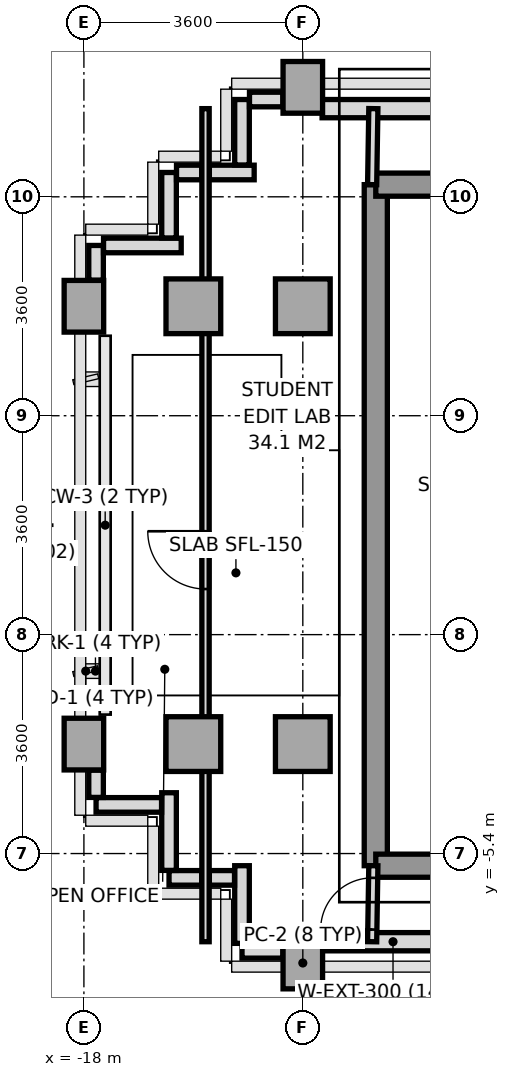
"""IFC4 building model, lengths in metres.
Left out: names, types, materials, properties, quantities, classifications, styles, units other than length and angle.
Written with IfcOpenShell. Run it as: python <this file> out.ifc"""

import sys

from ifc_helpers import new_model, si_unit, direction, frame, frame_2d, origin, origin_2d, place, context, subcontext, project, spatial, rectangle, extrude, source, transform, mapped, element, fill, save


model = new_model("IFC4")
c1 = context("Model", 3, precision=1e-05, world=origin(), true_north=direction((0.0, 1.0)))
c2 = subcontext(c1, "Body", "Model", "MODEL_VIEW")
j1 = project(units=[si_unit("LENGTHUNIT", "METRE"), si_unit("PLANEANGLEUNIT", "RADIAN")], contexts=[c1])
p1 = place(None, origin())
s1 = spatial("IfcSite", under=j1, at=p1, CompositionType="ELEMENT")
p2 = place(p1, origin())
s2 = spatial("IfcBuilding", under=s1, at=p2, CompositionType="ELEMENT")
p3 = place(p2, frame((0.0, 0.0, 170.6)))
s3 = spatial("IfcBuildingStorey", under=s2, at=p3, CompositionType="ELEMENT", Elevation=170.6)
m1 = source(origin(), c2, "Body", "SweptSolid", [
    extrude(rectangle(XDim=0.65, YDim=0.85, at=origin_2d()), origin(), (0.0, 0.0, 1.0), 3.2),
])
for number, where, z_axis, x_axis in (
    (1, (-18.0, -3.6, 0.0), (0.0, 0.0, 1.0), (1.0, 0.0, 0.0)),
    (2, (-18.0, 3.6, 0.0), (0.0, 0.0, 1.0), (1.0, 0.0, 0.0)),
):
    element("IfcColumn", number, at=place(p3, frame(where, z_axis=z_axis, x_axis=x_axis)), inside=s3, PredefinedType="COLUMN", context=c2, shape_type="MappedRepresentation", body=[
        mapped(m1, transform((0.0, 0.0, 0.0), x_axis=(1.0, 0.0, 0.0), y_axis=(0.0, 1.0, 0.0), z_axis=(0.0, 0.0, 1.0), scale=1.0)),
    ])
m2 = source(origin(), c2, "Body", "SweptSolid", [
    extrude(rectangle(XDim=0.9, YDim=0.9, at=origin_2d()), origin(), (0.0, 0.0, 1.0), 3.2),
])
for number, where, z_axis, x_axis in (
    (3, (-16.2, -3.6, 0.0), (0.0, 0.0, 1.0), (1.0, 0.0, 0.0)),
    (4, (-16.2, 3.6, 0.0), (0.0, 0.0, 1.0), (1.0, 0.0, 0.0)),
):
    element("IfcColumn", number, at=place(p3, frame(where, z_axis=z_axis, x_axis=x_axis)), inside=s3, PredefinedType="COLUMN", context=c2, shape_type="MappedRepresentation", body=[
        mapped(m2, transform((0.0, 0.0, 0.0), x_axis=(1.0, 0.0, 0.0), y_axis=(0.0, 1.0, 0.0), z_axis=(0.0, 0.0, 1.0), scale=1.0)),
    ])
p4 = place(p3, frame((-14.4, -7.2, 0.0), z_axis=(0.0, 0.0, 1.0), x_axis=(1.0, 0.0, 0.0)))
e5 = element("IfcColumn", 5, at=p4, inside=s3, PredefinedType="COLUMN", context=c2, shape_type="MappedRepresentation", body=[
    mapped(m1, transform((0.0, 0.0, 0.0), x_axis=(1.0, 0.0, 0.0), y_axis=(0.0, 1.0, 0.0), z_axis=(0.0, 0.0, 1.0), scale=1.0)),
])
for number, where, z_axis, x_axis in (
    (6, (-14.4, -3.6, 0.0), (0.0, 0.0, 1.0), (1.0, 0.0, 0.0)),
    (7, (-14.4, 3.6, 0.0), (0.0, 0.0, 1.0), (1.0, 0.0, 0.0)),
):
    element("IfcColumn", number, at=place(p3, frame(where, z_axis=z_axis, x_axis=x_axis)), inside=s3, PredefinedType="COLUMN", context=c2, shape_type="MappedRepresentation", body=[
        mapped(m2, transform((0.0, 0.0, 0.0), x_axis=(1.0, 0.0, 0.0), y_axis=(0.0, 1.0, 0.0), z_axis=(0.0, 0.0, 1.0), scale=1.0)),
    ])
p5 = place(p3, frame((-14.4, 7.2, 0.0), z_axis=(0.0, 0.0, 1.0), x_axis=(1.0, 0.0, 0.0)))
e8 = element("IfcColumn", 8, at=p5, inside=s3, PredefinedType="COLUMN", context=c2, shape_type="MappedRepresentation", body=[
    mapped(m1, transform((0.0, 0.0, 0.0), x_axis=(1.0, 0.0, 0.0), y_axis=(0.0, 1.0, 0.0), z_axis=(0.0, 0.0, 1.0), scale=1.0)),
])
p6 = place(p3, frame((-14.083, 6.85, 0.0), z_axis=(0.0, 0.0, 1.0), x_axis=(1.0, 0.0, 0.0)))
e9 = element("IfcWall", 9, at=p6, inside=s3, PredefinedType="SOLIDWALL", context=c2, shape_type="SweptSolid", body=[
    extrude(rectangle(XDim=2.635, YDim=0.3, at=frame_2d((1.317, 0.0))), origin(), (0.0, 0.0, 1.0), 3.2),
])
p7 = place(p3, frame((-14.083, -6.85, 0.0), z_axis=(0.0, 0.0, 1.0), x_axis=(1.0, 0.0, 0.0)))
e10 = element("IfcWall", 10, at=p7, inside=s3, PredefinedType="SOLIDWALL", context=c2, shape_type="SweptSolid", body=[
    extrude(rectangle(XDim=2.333, YDim=0.3, at=frame_2d((1.167, 0.0))), origin(), (0.0, 0.0, 1.0), 3.2),
])
p8 = place(p3, frame((-14.728, -7.0, 0.0), z_axis=(0.0, 0.0, 1.0), x_axis=(-1.0, 0.0, 0.0)))
e11 = element("IfcWall", 11, at=p8, inside=s3, PredefinedType="PARAPET", context=c2, shape_type="SweptSolid", body=[
    extrude(rectangle(XDim=0.672, YDim=0.24, at=frame_2d((0.336, 0.0))), origin(), (0.0, 0.0, 1.0), 1.15),
])
p9 = place(p3, frame((-15.4, -6.877, 0.0), z_axis=(0.0, 0.0, 1.0), x_axis=(0.0, 1.0, 0.0)))
e12 = element("IfcWall", 12, at=p9, inside=s3, PredefinedType="PARAPET", context=c2, shape_type="SweptSolid", body=[
    extrude(rectangle(XDim=1.277, YDim=0.24, at=frame_2d((0.638, 0.0))), origin(), (0.0, 0.0, 1.0), 1.15),
])
p10 = place(p3, frame((-15.523, -5.8, 0.0), z_axis=(0.0, 0.0, 1.0), x_axis=(-1.0, 0.0, 0.0)))
e13 = element("IfcWall", 13, at=p10, inside=s3, PredefinedType="PARAPET", context=c2, shape_type="SweptSolid", body=[
    extrude(rectangle(XDim=0.414, YDim=0.24, at=frame_2d((0.207, 0.0))), origin(), (0.0, 0.0, 1.0), 1.15),
])
p11 = place(p3, frame((-16.063, -5.8, 0.0), z_axis=(0.0, 0.0, 1.0), x_axis=(-1.0, 0.0, 0.0)))
e14 = element("IfcWall", 14, at=p11, inside=s3, PredefinedType="PARAPET", context=c2, shape_type="SweptSolid", body=[
    extrude(rectangle(XDim=0.537, YDim=0.24, at=frame_2d((0.269, 0.0))), origin(), (0.0, 0.0, 1.0), 1.15),
])
p12 = place(p3, frame((-16.6, -5.677, 0.0), z_axis=(0.0, 0.0, 1.0), x_axis=(0.0, 1.0, 0.0)))
e15 = element("IfcWall", 15, at=p12, inside=s3, PredefinedType="PARAPET", context=c2, shape_type="SweptSolid", body=[
    extrude(rectangle(XDim=1.277, YDim=0.24, at=frame_2d((0.639, 0.0))), origin(), (0.0, 0.0, 1.0), 1.15),
])
p13 = place(p3, frame((-16.723, -4.6, 0.0), z_axis=(0.0, 0.0, 1.0), x_axis=(-1.0, 0.0, 0.0)))
e16 = element("IfcWall", 16, at=p13, inside=s3, PredefinedType="PARAPET", context=c2, shape_type="SweptSolid", body=[
    extrude(rectangle(XDim=1.077, YDim=0.24, at=frame_2d((0.539, 0.0))), origin(), (0.0, 0.0, 1.0), 1.15),
])
p14 = place(p3, frame((-17.8, -4.477, 0.0), z_axis=(0.0, 0.0, 1.0), x_axis=(0.0, 1.0, 0.0)))
e17 = element("IfcWall", 17, at=p14, inside=s3, PredefinedType="PARAPET", context=c2, shape_type="SweptSolid", body=[
    extrude(rectangle(XDim=0.449, YDim=0.24, at=frame_2d((0.225, 0.0))), origin(), (0.0, 0.0, 1.0), 1.15),
])
p15 = place(p3, frame((-17.8, 4.028, 0.0), z_axis=(0.0, 0.0, 1.0), x_axis=(0.0, 1.0, 0.0)))
e18 = element("IfcWall", 18, at=p15, inside=s3, PredefinedType="PARAPET", context=c2, shape_type="SweptSolid", body=[
    extrude(rectangle(XDim=0.572, YDim=0.24, at=frame_2d((0.286, 0.0))), origin(), (0.0, 0.0, 1.0), 1.15),
])
p16 = place(p3, frame((-17.677, 4.6, 0.0), z_axis=(0.0, 0.0, 1.0), x_axis=(1.0, 0.0, 0.0)))
e19 = element("IfcWall", 19, at=p16, inside=s3, PredefinedType="PARAPET", context=c2, shape_type="SweptSolid", body=[
    extrude(rectangle(XDim=1.277, YDim=0.24, at=frame_2d((0.639, 0.0))), origin(), (0.0, 0.0, 1.0), 1.15),
])
p17 = place(p3, frame((-16.6, 4.723, 0.0), z_axis=(0.0, 0.0, 1.0), x_axis=(0.0, 1.0, 0.0)))
e20 = element("IfcWall", 20, at=p17, inside=s3, PredefinedType="PARAPET", context=c2, shape_type="SweptSolid", body=[
    extrude(rectangle(XDim=1.077, YDim=0.24, at=frame_2d((0.539, 0.0))), origin(), (0.0, 0.0, 1.0), 1.15),
])
p18 = place(p3, frame((-16.477, 5.8, 0.0), z_axis=(0.0, 0.0, 1.0), x_axis=(1.0, 0.0, 0.0)))
e21 = element("IfcWall", 21, at=p18, inside=s3, PredefinedType="PARAPET", context=c2, shape_type="SweptSolid", body=[
    extrude(rectangle(XDim=0.414, YDim=0.24, at=frame_2d((0.207, 0.0))), origin(), (0.0, 0.0, 1.0), 1.15),
])
p19 = place(p3, frame((-15.937, 5.8, 0.0), z_axis=(0.0, 0.0, 1.0), x_axis=(1.0, 0.0, 0.0)))
e22 = element("IfcWall", 22, at=p19, inside=s3, PredefinedType="PARAPET", context=c2, shape_type="SweptSolid", body=[
    extrude(rectangle(XDim=0.737, YDim=0.24, at=frame_2d((0.369, 0.0))), origin(), (0.0, 0.0, 1.0), 1.15),
])
p20 = place(p3, frame((-15.4, 5.923, 0.0), z_axis=(0.0, 0.0, 1.0), x_axis=(0.0, 1.0, 0.0)))
e23 = element("IfcWall", 23, at=p20, inside=s3, PredefinedType="PARAPET", context=c2, shape_type="SweptSolid", body=[
    extrude(rectangle(XDim=1.077, YDim=0.24, at=frame_2d((0.539, 0.0))), origin(), (0.0, 0.0, 1.0), 1.15),
])
p21 = place(p3, frame((-15.277, 7.0, 0.0), z_axis=(0.0, 0.0, 1.0), x_axis=(1.0, 0.0, 0.0)))
e24 = element("IfcWall", 24, at=p21, inside=s3, PredefinedType="PARAPET", context=c2, shape_type="SweptSolid", body=[
    extrude(rectangle(XDim=0.549, YDim=0.24, at=frame_2d((0.274, 0.0))), origin(), (0.0, 0.0, 1.0), 1.15),
])
p22 = place(p3, frame((-13.2, -5.6, 0.0), z_axis=(0.0, 0.0, 1.0), x_axis=(0.0, 1.0, 0.0)))
e25 = element("IfcWall", 25, at=p22, inside=s3, PredefinedType="SHEAR", context=c2, shape_type="SweptSolid", body=[
    extrude(rectangle(XDim=11.2, YDim=0.38, at=frame_2d((5.6, 0.0))), origin(), (0.0, 0.0, 1.0), 3.2),
])
p23 = place(p3, frame((-13.2, 5.6, 0.0), z_axis=(0.0, 0.0, 1.0), x_axis=(1.0, 0.0, 0.0)))
e26 = element("IfcWall", 26, at=p23, inside=s3, PredefinedType="SHEAR", context=c2, shape_type="SweptSolid", body=[
    extrude(rectangle(XDim=1.844, YDim=0.38, at=frame_2d((0.922, 0.0))), origin(), (0.0, 0.0, 1.0), 3.2),
])
p24 = place(p3, frame((-13.2, -5.6, 0.0), z_axis=(0.0, 0.0, 1.0), x_axis=(1.0, 0.0, 0.0)))
e27 = element("IfcWall", 27, at=p24, inside=s3, PredefinedType="SHEAR", context=c2, shape_type="SweptSolid", body=[
    extrude(rectangle(XDim=7.8, YDim=0.38, at=frame_2d((3.9, 0.0))), origin(), (0.0, 0.0, 1.0), 3.2),
])
p25 = place(p24, frame((3.6, 0.0, 0.0)))
e28 = element("IfcOpeningElement", 28, at=p25, cuts=e27, PredefinedType="OPENING", context=c2, shape_type="SweptSolid", body=[
    extrude(rectangle(XDim=1.2, YDim=2.2, at=frame_2d((0.6, 1.1))), frame((0.0, 0.2, 0.0), z_axis=(0.0, -1.0, 0.0), x_axis=(1.0, 0.0, 0.0)), (0.0, 0.0, 1.0), 0.4),
])
p26 = place(p3, frame((-13.26, 5.6, 0.0), z_axis=(0.0, 0.0, 1.0), x_axis=(0.016013571389, 0.999871774545, 0.0)))
e29 = element("IfcWall", 29, at=p26, inside=s3, PredefinedType="PARTITIONING", context=c2, shape_type="SweptSolid", body=[
    extrude(rectangle(XDim=1.25, YDim=0.15, at=frame_2d((0.625, 0.0))), origin(), (0.0, 0.0, 1.0), 3.2),
])
p27 = place(p3, frame((-13.26, -6.85, 0.0), z_axis=(0.0, 0.0, 1.0), x_axis=(0.016013571389, 0.999871774545, 0.0)))
e30 = element("IfcWall", 30, at=p27, inside=s3, PredefinedType="PARTITIONING", context=c2, shape_type="SweptSolid", body=[
    extrude(rectangle(XDim=1.25, YDim=0.15, at=frame_2d((0.625, 0.0))), origin(), (0.0, 0.0, 1.0), 3.2),
])
p28 = place(p27, frame((0.2, 0.0, 0.0)))
e31 = element("IfcOpeningElement", 31, at=p28, cuts=e30, PredefinedType="OPENING", context=c2, shape_type="SweptSolid", body=[
    extrude(rectangle(XDim=0.85, YDim=2.1, at=frame_2d((0.425, 1.05))), frame((0.0, 0.085, 0.0), z_axis=(0.0, -1.0, 0.0), x_axis=(1.0, 0.0, 0.0)), (0.0, 0.0, 1.0), 0.17),
])
p29 = place(p3, frame((-16.0, -6.85, 0.0), z_axis=(0.0, 0.0, 1.0), x_axis=(0.0, 1.0, 0.0)))
e32 = element("IfcWall", 32, at=p29, inside=s3, PredefinedType="PARTITIONING", context=c2, shape_type="SweptSolid", body=[
    extrude(rectangle(XDim=13.7, YDim=0.12, at=frame_2d((6.85, 0.0))), origin(), (0.0, 0.0, 1.0), 3.2),
])
p30 = place(p29, frame((5.8, 0.0, 0.0)))
e33 = element("IfcOpeningElement", 33, at=p30, cuts=e32, PredefinedType="OPENING", context=c2, shape_type="SweptSolid", body=[
    extrude(rectangle(XDim=0.95, YDim=2.15, at=frame_2d((0.475, 1.075))), frame((0.0, 0.07, 0.0), z_axis=(0.0, -1.0, 0.0), x_axis=(1.0, 0.0, 0.0)), (0.0, 0.0, 1.0), 0.14),
])
m3 = source(origin(), c2, "Body", "SweptSolid", [
    extrude(rectangle(XDim=0.85, YDim=2.1, at=frame_2d((0.425, 1.05))), frame((0.0, 0.025, 0.0), z_axis=(0.0, -1.0, 0.0), x_axis=(1.0, 0.0, 0.0)), (0.0, 0.0, 1.0), 0.05),
])
p31 = place(p28, origin())
e34 = element("IfcDoor", 34, at=p31, inside=s3, OperationType="SINGLE_SWING_LEFT", PredefinedType="DOOR", context=c2, shape_type="MappedRepresentation", body=[
    mapped(m3, transform((0.0, 0.0, 0.0), x_axis=(1.0, 0.0, 0.0), y_axis=(0.0, 1.0, 0.0), z_axis=(0.0, 0.0, 1.0), scale=1.0)),
])
fill(e31, e34)
m4 = source(origin(), c2, "Body", "SweptSolid", [
    extrude(rectangle(XDim=0.95, YDim=2.15, at=frame_2d((0.475, 1.075))), frame((0.0, 0.025, 0.0), z_axis=(0.0, -1.0, 0.0), x_axis=(1.0, 0.0, 0.0)), (0.0, 0.0, 1.0), 0.05),
])
p32 = place(p30, origin())
e35 = element("IfcDoor", 35, at=p32, inside=s3, OperationType="SINGLE_SWING_RIGHT", PredefinedType="DOOR", context=c2, shape_type="MappedRepresentation", body=[
    mapped(m4, transform((0.0, 0.0, 0.0), x_axis=(1.0, 0.0, 0.0), y_axis=(0.0, 1.0, 0.0), z_axis=(0.0, 0.0, 1.0), scale=1.0)),
])
fill(e33, e35)
save(model, sys.argv[1])
